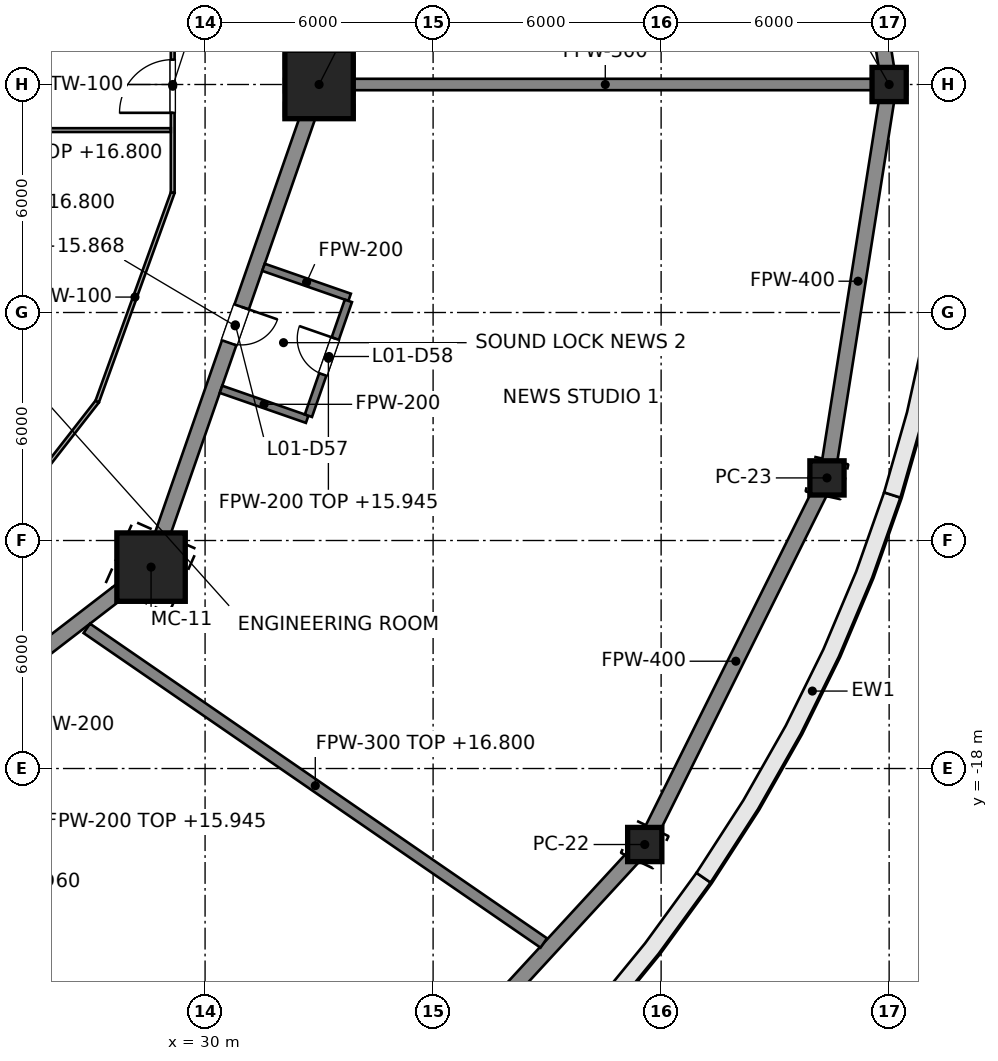
"""IFC4 building model, lengths in metres.
Left out: names, types, materials, properties, quantities, classifications, styles, units other than length and angle.
Written with IfcOpenShell. Run it as: python <this file> out.ifc"""

import sys

from ifc_helpers import new_model, si_unit, direction, frame, frame_2d, origin, origin_2d, place, context, subcontext, project, spatial, polyline, rectangle, hollow_rectangle, outline, extrude, element, fill, save


model = new_model("IFC4")
c1 = context("Model", 3, precision=1e-05, world=origin(), true_north=direction((0.0, 1.0)))
c2 = subcontext(c1, "Body", "Model", "MODEL_VIEW")
j1 = project(units=[si_unit("LENGTHUNIT", "METRE"), si_unit("PLANEANGLEUNIT", "RADIAN")], contexts=[c1])
p1 = place(None, origin())
s1 = spatial("IfcSite", under=j1, at=p1, CompositionType="ELEMENT")
p2 = place(p1, origin())
s2 = spatial("IfcBuilding", under=s1, at=p2, CompositionType="ELEMENT")
p3 = place(p2, frame((0.0, 0.0, 8.0)))
s3 = spatial("IfcBuildingStorey", under=s2, at=p3, CompositionType="ELEMENT", Elevation=8.0)
for number, where, z_axis, x_axis in (
    (1, (33.0, 0.0, 0.0), (0.0, 0.0, 1.0), (1.0, 0.0, 0.0)),
    (2, (28.579, -12.7, 0.0), (0.0, 0.0, 1.0), (0.914, -0.406, 0.0)),
):
    element("IfcColumn", number, at=place(p3, frame(where, z_axis=z_axis, x_axis=x_axis)), inside=s3, PredefinedType="COLUMN", context=c2, shape_type="SweptSolid", body=[
        extrude(hollow_rectangle(XDim=1.8, YDim=1.8, WallThickness=0.08, at=origin_2d()), origin(), (0.0, 0.0, 1.0), 9.0),
    ])
for number, where, z_axis, x_axis in (
    (3, (48.0, 0.0, 0.0), (0.0, 0.0, 1.0), (1.0, 0.0, 0.0)),
    (4, (41.569, -20.0, 0.0), (0.0, 0.0, 1.0), (0.901, -0.434, 0.0)),
    (5, (46.365, -10.353, 0.0), (0.0, 0.0, 1.0), (0.976, -0.218, 0.0)),
):
    element("IfcColumn", number, at=place(p3, frame(where, z_axis=z_axis, x_axis=x_axis)), inside=s3, PredefinedType="COLUMN", context=c2, shape_type="SweptSolid", body=[
        extrude(hollow_rectangle(XDim=0.9, YDim=0.9, WallThickness=0.04, at=origin_2d()), origin(), (0.0, 0.0, 1.0), 9.0),
    ])
p4 = place(p3, origin())
e6 = element("IfcWall", 6, at=p4, inside=s3, PredefinedType="SOLIDWALL", context=c2, shape_type="SweptSolid", body=[
    extrude(outline(polyline([(50.0, 0.0), (49.931, 2.198), (49.726, 4.39), (49.385, 6.57), (48.907, 8.732), (48.296, 10.87), (47.868, 10.734), (48.471, 8.622), (48.942, 6.487), (49.28, 4.334), (49.482, 2.17), (49.55, 0.0), (50.0, 0.0)])), origin(), (0.0, 0.0, 1.0), 8.8),
])
e7 = element("IfcWall", 7, at=p4, inside=s3, PredefinedType="SOLIDWALL", context=c2, shape_type="SweptSolid", body=[
    extrude(outline(polyline([(35.355, -29.698), (37.157, -28.104), (38.857, -26.431), (40.451, -24.687), (41.934, -22.875), (43.301, -21.0), (42.93, -20.745), (41.577, -22.6), (40.11, -24.393), (38.533, -26.119), (36.85, -27.774), (35.066, -29.354), (35.355, -29.698)])), origin(), (0.0, 0.0, 1.0), 8.8),
])
e8 = element("IfcWall", 8, at=p4, inside=s3, PredefinedType="SOLIDWALL", context=c2, shape_type="SweptSolid", body=[
    extrude(outline(polyline([(43.301, -21.0), (44.55, -19.068), (45.677, -17.083), (46.679, -15.052), (47.553, -12.979), (48.296, -10.87), (47.868, -10.734), (47.133, -12.816), (46.27, -14.865), (45.28, -16.872), (44.166, -18.834), (42.93, -20.745), (43.301, -21.0)])), origin(), (0.0, 0.0, 1.0), 8.8),
])
e9 = element("IfcWall", 9, at=p4, inside=s3, PredefinedType="SOLIDWALL", context=c2, shape_type="SweptSolid", body=[
    extrude(outline(polyline([(48.296, -10.87), (48.907, -8.732), (49.385, -6.57), (49.726, -4.39), (49.931, -2.198), (50.0, 0.0), (49.55, 0.0), (49.482, -2.17), (49.28, -4.334), (48.942, -6.487), (48.471, -8.622), (47.868, -10.734), (48.296, -10.87)])), origin(), (0.0, 0.0, 1.0), 8.8),
])
p5 = place(p3, frame((48.0, 0.0, 0.0), z_axis=(0.0, 0.0, 1.0), x_axis=(-0.156041518224, 0.987750497135, 0.0)))
e10 = element("IfcWall", 10, at=p5, inside=s3, PredefinedType="PARTITIONING", context=c2, shape_type="SweptSolid", body=[
    extrude(rectangle(XDim=10.481, YDim=0.4, at=frame_2d((5.241, 0.0))), origin(), (0.0, 0.0, 1.0), 7.877),
])
p6 = place(p3, frame((33.941, -28.284, 0.0), z_axis=(0.0, 0.0, 1.0), x_axis=(0.67736833065, 0.735644033914, 0.0)))
e11 = element("IfcWall", 11, at=p6, inside=s3, PredefinedType="PARTITIONING", context=c2, shape_type="SweptSolid", body=[
    extrude(rectangle(XDim=11.261, YDim=0.4, at=frame_2d((5.631, 0.0))), origin(), (0.0, 0.0, 1.0), 7.877),
])
p7 = place(p3, frame((41.569, -20.0, 0.0), z_axis=(0.0, 0.0, 1.0), x_axis=(0.445118441463, 0.895471704226, 0.0)))
e12 = element("IfcWall", 12, at=p7, inside=s3, PredefinedType="PARTITIONING", context=c2, shape_type="SweptSolid", body=[
    extrude(rectangle(XDim=10.773, YDim=0.4, at=frame_2d((5.387, 0.0))), origin(), (0.0, 0.0, 1.0), 7.877),
])
p8 = place(p3, frame((46.365, -10.353, 0.0), z_axis=(0.0, 0.0, 1.0), x_axis=(0.156041518224, 0.987750497135, 0.0)))
e13 = element("IfcWall", 13, at=p8, inside=s3, PredefinedType="PARTITIONING", context=c2, shape_type="SweptSolid", body=[
    extrude(rectangle(XDim=10.481, YDim=0.4, at=frame_2d((5.241, 0.0))), origin(), (0.0, 0.0, 1.0), 7.877),
])
p9 = place(p3, frame((33.0, 0.0, 0.0), z_axis=(0.0, 0.0, 1.0), x_axis=(-0.328770590399, 0.944409815117, 0.0)))
e14 = element("IfcWall", 14, at=p9, inside=s3, PredefinedType="PARTITIONING", context=c2, shape_type="SweptSolid", body=[
    extrude(rectangle(XDim=13.448, YDim=0.4, at=frame_2d((6.724, 0.0))), origin(), (0.0, 0.0, 1.0), 7.868),
])
p10 = place(p9, frame((6.25, 0.0, 0.0)))
e15 = element("IfcOpeningElement", 15, at=p10, cuts=e14, PredefinedType="OPENING", context=c2, shape_type="SweptSolid", body=[
    extrude(rectangle(XDim=1.0, YDim=2.1, at=frame_2d((0.5, 1.05))), frame((0.0, 0.2, 0.0), z_axis=(0.0, -1.0, 0.0), x_axis=(1.0, 0.0, 0.0)), (0.0, 0.0, 1.0), 0.4),
])
p11 = place(p3, frame((16.5, -21.997, 0.0), z_axis=(0.0, 0.0, 1.0), x_axis=(0.792443539308, 0.609945273782, 0.0)))
e16 = element("IfcWall", 16, at=p11, inside=s3, PredefinedType="PARTITIONING", context=c2, shape_type="SweptSolid", body=[
    extrude(rectangle(XDim=15.242, YDim=0.4, at=frame_2d((7.621, 0.0))), origin(), (0.0, 0.0, 1.0), 7.868),
])
p12 = place(p11, frame((7.15, 0.0, 0.0)))
e17 = element("IfcOpeningElement", 17, at=p12, cuts=e16, PredefinedType="OPENING", context=c2, shape_type="SweptSolid", body=[
    extrude(rectangle(XDim=1.0, YDim=2.1, at=frame_2d((0.5, 1.05))), frame((0.0, 0.2, 0.0), z_axis=(0.0, -1.0, 0.0), x_axis=(1.0, 0.0, 0.0)), (0.0, 0.0, 1.0), 0.4),
])
p13 = place(p3, frame((28.579, -12.7, 0.0), z_axis=(0.0, 0.0, 1.0), x_axis=(0.328770590399, 0.944409815117, 0.0)))
e18 = element("IfcWall", 18, at=p13, inside=s3, PredefinedType="PARTITIONING", context=c2, shape_type="SweptSolid", body=[
    extrude(rectangle(XDim=13.448, YDim=0.4, at=frame_2d((6.724, 0.0))), origin(), (0.0, 0.0, 1.0), 7.868),
])
p14 = place(p13, frame((6.25, 0.0, 0.0)))
e19 = element("IfcOpeningElement", 19, at=p14, cuts=e18, PredefinedType="OPENING", context=c2, shape_type="SweptSolid", body=[
    extrude(rectangle(XDim=1.0, YDim=2.1, at=frame_2d((0.5, 1.05))), frame((0.0, 0.2, 0.0), z_axis=(0.0, -1.0, 0.0), x_axis=(1.0, 0.0, 0.0)), (0.0, 0.0, 1.0), 0.4),
])
p15 = place(p3, frame((23.325, -13.271, 0.0), z_axis=(0.0, 0.0, 1.0), x_axis=(0.614354540541, 0.78903009988, 0.0)))
e20 = element("IfcWall", 20, at=p15, inside=s3, PredefinedType="PARTITIONING", context=c2, shape_type="SweptSolid", body=[
    extrude(rectangle(XDim=6.246, YDim=0.1, at=frame_2d((3.123, 0.0))), origin(), (0.0, 0.0, 1.0), 7.945),
])
p16 = place(p3, frame((27.162, -8.343, 0.0), z_axis=(0.0, 0.0, 1.0), x_axis=(0.339837423604, 0.940484197378, 0.0)))
e21 = element("IfcWall", 21, at=p16, inside=s3, PredefinedType="PARTITIONING", context=c2, shape_type="SweptSolid", body=[
    extrude(rectangle(XDim=5.845, YDim=0.1, at=frame_2d((2.922, 0.0))), origin(), (0.0, 0.0, 1.0), 7.877),
])
p17 = place(p3, frame((29.148, -2.845, 0.0), z_axis=(0.0, 0.0, 1.0), x_axis=(0.0, 1.0, 0.0)))
e22 = element("IfcWall", 22, at=p17, inside=s3, PredefinedType="PARTITIONING", context=c2, shape_type="SweptSolid", body=[
    extrude(rectangle(XDim=5.691, YDim=0.1, at=frame_2d((2.845, 0.0))), origin(), (0.0, 0.0, 1.0), 7.877),
])
p18 = place(p17, frame((2.1, 0.0, 0.0)))
e23 = element("IfcOpeningElement", 23, at=p18, cuts=e22, PredefinedType="OPENING", context=c2, shape_type="SweptSolid", body=[
    extrude(rectangle(XDim=1.4, YDim=2.1, at=frame_2d((0.7, 1.05))), frame((0.0, 0.05, 0.0), z_axis=(0.0, -1.0, 0.0), x_axis=(1.0, 0.0, 0.0)), (0.0, 0.0, 1.0), 0.1),
])
p19 = place(p3, frame((18.05, -1.2, 0.0), z_axis=(0.0, 0.0, 1.0), x_axis=(1.0, 0.0, 0.0)))
e24 = element("IfcWall", 24, at=p19, inside=s3, PredefinedType="PARTITIONING", context=c2, shape_type="SweptSolid", body=[
    extrude(rectangle(XDim=11.048, YDim=0.1, at=frame_2d((5.524, 0.0))), origin(), (0.0, 0.0, 1.0), 8.8),
])
p20 = place(p3, frame((33.264, 0.0, 0.0), z_axis=(0.0, 0.0, 1.0), x_axis=(1.0, 0.0, 0.0)))
e25 = element("IfcWall", 25, at=p20, inside=s3, PredefinedType="PARTITIONING", context=c2, shape_type="SweptSolid", body=[
    extrude(rectangle(XDim=14.534, YDim=0.3, at=frame_2d((7.267, 0.0))), origin(), (0.0, 0.0, 1.0), 8.026),
])
p21 = place(p3, frame((26.888, -14.312, 0.0), z_axis=(0.0, 0.0, 1.0), x_axis=(0.823646474485, -0.567103592889, 0.0)))
e26 = element("IfcWall", 26, at=p21, inside=s3, PredefinedType="PARTITIONING", context=c2, shape_type="SweptSolid", body=[
    extrude(rectangle(XDim=14.598, YDim=0.3, at=frame_2d((7.299, 0.0))), origin(), (0.0, 0.0, 1.0), 8.8),
])
for number, where, z_axis, x_axis in (
    (27, (30.419, -8.021, 0.0), (0.0, 0.0, 1.0), (0.944, -0.329, 0.0)),
    (28, (31.537, -4.81, 0.0), (0.0, 0.0, 1.0), (0.944, -0.329, 0.0)),
):
    element("IfcWall", number, at=place(p3, frame(where, z_axis=z_axis, x_axis=x_axis)), inside=s3, PredefinedType="PARTITIONING", context=c2, shape_type="SweptSolid", body=[
        extrude(rectangle(XDim=2.4, YDim=0.2, at=frame_2d((1.2, 0.0))), origin(), (0.0, 0.0, 1.0), 8.8),
    ])
p22 = place(p3, frame((32.719, -8.716, 0.0), z_axis=(0.0, 0.0, 1.0), x_axis=(0.328742544754, 0.944419577978, 0.0)))
e29 = element("IfcWall", 29, at=p22, inside=s3, PredefinedType="PARTITIONING", context=c2, shape_type="SweptSolid", body=[
    extrude(rectangle(XDim=3.2, YDim=0.2, at=frame_2d((1.6, 0.0))), origin(), (0.0, 0.0, 1.0), 7.945),
])
p23 = place(p22, frame((1.15, 0.0, 0.0)))
e30 = element("IfcOpeningElement", 30, at=p23, cuts=e29, PredefinedType="OPENING", context=c2, shape_type="SweptSolid", body=[
    extrude(rectangle(XDim=1.0, YDim=2.1, at=frame_2d((0.5, 1.05))), frame((0.0, 0.1, 0.0), z_axis=(0.0, -1.0, 0.0), x_axis=(1.0, 0.0, 0.0)), (0.0, 0.0, 1.0), 0.2),
])
p24 = place(p18, origin())
e31 = element("IfcDoor", 31, at=p24, inside=s3, OperationType="SINGLE_SWING_LEFT", PredefinedType="DOOR", context=c2, shape_type="SweptSolid", body=[
    extrude(rectangle(XDim=1.4, YDim=2.1, at=frame_2d((0.7, 1.05))), frame((0.0, 0.025, 0.0), z_axis=(0.0, -1.0, 0.0), x_axis=(1.0, 0.0, 0.0)), (0.0, 0.0, 1.0), 0.05),
])
fill(e23, e31)
p25 = place(p14, origin())
e32 = element("IfcDoor", 32, at=p25, inside=s3, OperationType="SINGLE_SWING_RIGHT", PredefinedType="DOOR", context=c2, shape_type="SweptSolid", body=[
    extrude(rectangle(XDim=1.0, YDim=2.1, at=frame_2d((0.5, 1.05))), frame((0.0, 0.025, 0.0), z_axis=(0.0, -1.0, 0.0), x_axis=(1.0, 0.0, 0.0)), (0.0, 0.0, 1.0), 0.05),
])
fill(e19, e32)
p26 = place(p23, origin())
e33 = element("IfcDoor", 33, at=p26, inside=s3, OperationType="SINGLE_SWING_RIGHT", PredefinedType="DOOR", context=c2, shape_type="SweptSolid", body=[
    extrude(rectangle(XDim=1.0, YDim=2.1, at=frame_2d((0.5, 1.05))), frame((0.0, 0.025, 0.0), z_axis=(0.0, -1.0, 0.0), x_axis=(1.0, 0.0, 0.0)), (0.0, 0.0, 1.0), 0.05),
])
fill(e30, e33)
save(model, sys.argv[1])
